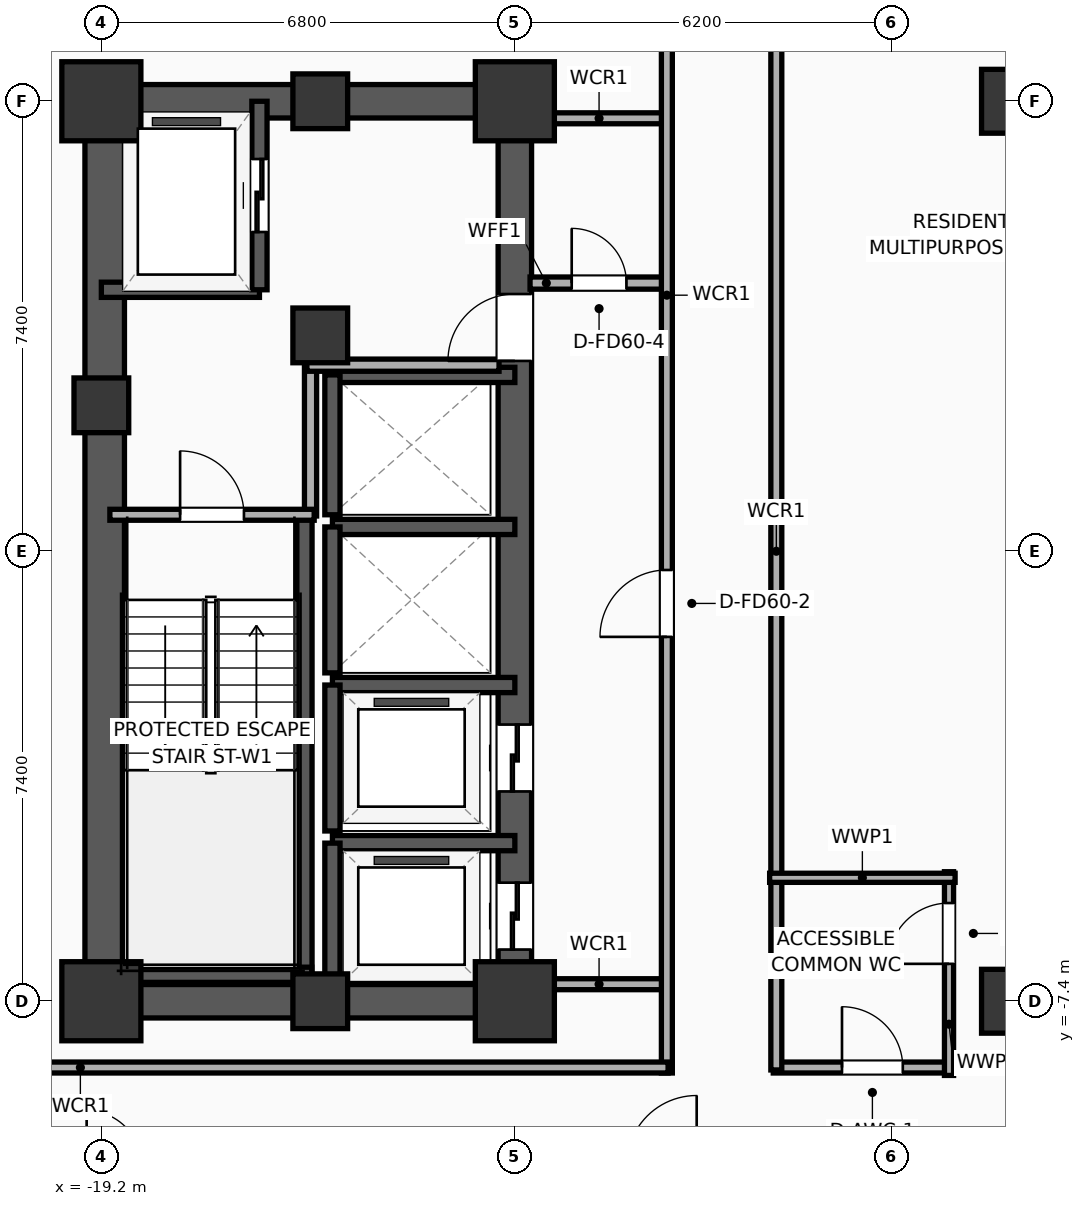
"""IFC4 building model, lengths in metres.
Left out: names, types, materials, properties, quantities, classifications, styles, units other than length and angle.
Written with IfcOpenShell. Run it as: python <this file> out.ifc"""

import sys

from ifc_helpers import new_model, si_unit, direction, frame, frame_2d, origin, origin_2d, place, context, subcontext, project, spatial, rectangle, extrude, element, fill, save


model = new_model("IFC4")
c1 = context("Model", 3, precision=1e-05, world=origin(), true_north=direction((0.0, 1.0)))
c2 = subcontext(c1, "Body", "Model", "MODEL_VIEW")
j1 = project(units=[si_unit("LENGTHUNIT", "METRE"), si_unit("PLANEANGLEUNIT", "RADIAN")], contexts=[c1])
p1 = place(None, origin())
s1 = spatial("IfcSite", under=j1, at=p1, CompositionType="ELEMENT")
p2 = place(p1, origin())
s2 = spatial("IfcBuilding", under=s1, at=p2, CompositionType="ELEMENT")
p3 = place(p2, frame((0.0, 0.0, 101.4)))
s3 = spatial("IfcBuildingStorey", under=s2, at=p3, CompositionType="ELEMENT", Elevation=101.4)
p4 = place(p3, frame((-19.2, -7.4, 0.0), z_axis=(0.0, 0.0, 1.0), x_axis=(1.0, 0.0, 0.0)))
e1 = element("IfcColumn", 1, at=p4, inside=s3, PredefinedType="COLUMN", context=c2, shape_type="SweptSolid", body=[
    extrude(rectangle(XDim=1.3, YDim=1.3, at=origin_2d()), origin(), (0.0, 0.0, 1.0), 3.9),
])
p5 = place(p3, frame((-19.2, 2.4, 0.0), z_axis=(0.0, 0.0, 1.0), x_axis=(1.0, 0.0, 0.0)))
e2 = element("IfcColumn", 2, at=p5, inside=s3, PredefinedType="COLUMN", context=c2, shape_type="SweptSolid", body=[
    extrude(rectangle(XDim=0.9, YDim=0.9, at=origin_2d()), origin(), (0.0, 0.0, 1.0), 3.9),
])
p6 = place(p3, frame((-19.2, 7.4, 0.0), z_axis=(0.0, 0.0, 1.0), x_axis=(1.0, 0.0, 0.0)))
e3 = element("IfcColumn", 3, at=p6, inside=s3, PredefinedType="COLUMN", context=c2, shape_type="SweptSolid", body=[
    extrude(rectangle(XDim=1.3, YDim=1.3, at=origin_2d()), origin(), (0.0, 0.0, 1.0), 3.9),
])
for number, where, z_axis, x_axis in (
    (4, (-15.6, -7.4, 0.0), (0.0, 0.0, 1.0), (1.0, 0.0, 0.0)),
    (5, (-15.6, 7.4, 0.0), (0.0, 0.0, 1.0), (1.0, 0.0, 0.0)),
):
    element("IfcColumn", number, at=place(p3, frame(where, z_axis=z_axis, x_axis=x_axis)), inside=s3, PredefinedType="COLUMN", context=c2, shape_type="SweptSolid", body=[
        extrude(rectangle(XDim=0.9, YDim=0.9, at=origin_2d()), origin(), (0.0, 0.0, 1.0), 3.9),
    ])
p7 = place(p3, frame((-12.4, -7.4, 0.0), z_axis=(0.0, 0.0, 1.0), x_axis=(1.0, 0.0, 0.0)))
e6 = element("IfcColumn", 6, at=p7, inside=s3, PredefinedType="COLUMN", context=c2, shape_type="SweptSolid", body=[
    extrude(rectangle(XDim=1.3, YDim=1.3, at=origin_2d()), origin(), (0.0, 0.0, 1.0), 3.9),
])
p8 = place(p3, frame((-15.6, 3.55, 0.0), z_axis=(0.0, 0.0, 1.0), x_axis=(1.0, 0.0, 0.0)))
e7 = element("IfcColumn", 7, at=p8, inside=s3, PredefinedType="COLUMN", context=c2, shape_type="SweptSolid", body=[
    extrude(rectangle(XDim=0.9, YDim=0.9, at=origin_2d()), origin(), (0.0, 0.0, 1.0), 3.9),
])
p9 = place(p3, frame((-12.4, 7.4, 0.0), z_axis=(0.0, 0.0, 1.0), x_axis=(1.0, 0.0, 0.0)))
e8 = element("IfcColumn", 8, at=p9, inside=s3, PredefinedType="COLUMN", context=c2, shape_type="SweptSolid", body=[
    extrude(rectangle(XDim=1.3, YDim=1.3, at=origin_2d()), origin(), (0.0, 0.0, 1.0), 3.9),
])
for number, where, z_axis, x_axis in (
    (9, (-19.475, -7.4, 0.0), (0.0, 0.0, 1.0), (1.0, 0.0, 0.0)),
    (10, (-19.475, 7.4, 0.0), (0.0, 0.0, 1.0), (1.0, 0.0, 0.0)),
):
    element("IfcWall", number, at=place(p3, frame(where, z_axis=z_axis, x_axis=x_axis)), inside=s3, PredefinedType="SHEAR", context=c2, shape_type="SweptSolid", body=[
        extrude(rectangle(XDim=7.35, YDim=0.55, at=frame_2d((3.675, 0.0))), origin(), (0.0, 0.0, 1.0), 3.65),
    ])
p10 = place(p3, frame((-19.145, -7.4, 0.0), z_axis=(0.0, 0.0, 1.0), x_axis=(0.0, 1.0, 0.0)))
e11 = element("IfcWall", 11, at=p10, inside=s3, PredefinedType="SHEAR", context=c2, shape_type="SweptSolid", body=[
    extrude(rectangle(XDim=14.8, YDim=0.65, at=frame_2d((7.4, 0.0))), origin(), (0.0, 0.0, 1.0), 3.65),
])
p11 = place(p3, frame((-12.4, -7.4, 0.0), z_axis=(0.0, 0.0, 1.0), x_axis=(0.0, 1.0, 0.0)))
e12 = element("IfcWall", 12, at=p11, inside=s3, PredefinedType="SHEAR", context=c2, shape_type="SweptSolid", body=[
    extrude(rectangle(XDim=14.8, YDim=0.55, at=frame_2d((7.4, 0.0))), origin(), (0.0, 0.0, 1.0), 3.65),
])
p12 = place(p11, frame((0.85, 0.0, 0.0)))
e13 = element("IfcOpeningElement", 13, at=p12, cuts=e12, PredefinedType="OPENING", context=c2, shape_type="SweptSolid", body=[
    extrude(rectangle(XDim=1.1, YDim=2.05, at=frame_2d((0.55, 1.025))), frame((0.0, 0.285, 0.0), z_axis=(0.0, -1.0, 0.0), x_axis=(1.0, 0.0, 0.0)), (0.0, 0.0, 1.0), 0.57),
])
p13 = place(p11, frame((3.45, 0.0, 0.0)))
e14 = element("IfcOpeningElement", 14, at=p13, cuts=e12, PredefinedType="OPENING", context=c2, shape_type="SweptSolid", body=[
    extrude(rectangle(XDim=1.1, YDim=2.05, at=frame_2d((0.55, 1.025))), frame((0.0, 0.285, 0.0), z_axis=(0.0, -1.0, 0.0), x_axis=(1.0, 0.0, 0.0)), (0.0, 0.0, 1.0), 0.57),
])
p14 = place(p11, frame((10.53, 0.0, 0.0)))
e15 = element("IfcOpeningElement", 15, at=p14, cuts=e12, PredefinedType="OPENING", context=c2, shape_type="SweptSolid", body=[
    extrude(rectangle(XDim=1.1, YDim=2.05, at=frame_2d((0.55, 1.025))), frame((0.0, 0.285, 0.0), z_axis=(0.0, -1.0, 0.0), x_axis=(1.0, 0.0, 0.0)), (0.0, 0.0, 1.0), 0.57),
])
p15 = place(p3, frame((-15.86, -7.085, 0.0), z_axis=(0.0, 0.0, 1.0), x_axis=(0.0, 1.0, 0.0)))
e16 = element("IfcWall", 16, at=p15, inside=s3, PredefinedType="SOLIDWALL", context=c2, shape_type="SweptSolid", body=[
    extrude(rectangle(XDim=7.685, YDim=0.25, at=frame_2d((3.843, 0.0))), origin(), (0.0, 0.0, 1.0), 3.65),
])
p16 = place(p3, frame((-19.2, -6.965, 0.0), z_axis=(0.0, 0.0, 1.0), x_axis=(1.0, 0.0, 0.0)))
e17 = element("IfcWall", 17, at=p16, inside=s3, PredefinedType="SOLIDWALL", context=c2, shape_type="SweptSolid", body=[
    extrude(rectangle(XDim=3.46, YDim=0.25, at=frame_2d((1.73, 0.0))), origin(), (0.0, 0.0, 1.0), 3.65),
])
for number, where, z_axis, x_axis in (
    (18, (-4.2, -7.4, 0.0), (0.0, 0.0, 1.0), (1.0, 0.0, 0.0)),
    (19, (-4.2, 7.4, 0.0), (0.0, 0.0, 1.0), (1.0, 0.0, 0.0)),
):
    element("IfcColumn", number, at=place(p3, frame(where, z_axis=z_axis, x_axis=x_axis)), inside=s3, PredefinedType="COLUMN", context=c2, shape_type="SweptSolid", body=[
        extrude(rectangle(XDim=1.05, YDim=1.05, at=origin_2d()), origin(), (0.0, 0.0, 1.0), 3.9),
    ])
p17 = place(p3, frame((-19.2, 4.3, 0.0), z_axis=(0.0, 0.0, 1.0), x_axis=(1.0, 0.0, 0.0)))
e20 = element("IfcWall", 20, at=p17, inside=s3, PredefinedType="SOLIDWALL", context=c2, shape_type="SweptSolid", body=[
    extrude(rectangle(XDim=2.6, YDim=0.25, at=frame_2d((1.3, 0.0))), origin(), (0.0, 0.0, 1.0), 3.65),
])
p18 = place(p3, frame((-16.6, 4.3, 0.0), z_axis=(0.0, 0.0, 1.0), x_axis=(0.0, 1.0, 0.0)))
e21 = element("IfcWall", 21, at=p18, inside=s3, PredefinedType="SOLIDWALL", context=c2, shape_type="SweptSolid", body=[
    extrude(rectangle(XDim=3.1, YDim=0.25, at=frame_2d((1.55, 0.0))), origin(), (0.0, 0.0, 1.0), 3.65),
])
p19 = place(p18, frame((0.95, 0.0, 0.0)))
e22 = element("IfcOpeningElement", 22, at=p19, cuts=e21, PredefinedType="OPENING", context=c2, shape_type="SweptSolid", body=[
    extrude(rectangle(XDim=1.2, YDim=2.05, at=frame_2d((0.6, 1.025))), frame((0.0, 0.135, 0.0), z_axis=(0.0, -1.0, 0.0), x_axis=(1.0, 0.0, 0.0)), (0.0, 0.0, 1.0), 0.27),
])
p20 = place(p3, frame((-12.4, -4.8, 0.0), z_axis=(0.0, 0.0, 1.0), x_axis=(-1.0, 0.0, 0.0)))
e23 = element("IfcWall", 23, at=p20, inside=s3, PredefinedType="SOLIDWALL", context=c2, shape_type="SweptSolid", body=[
    extrude(rectangle(XDim=3.0, YDim=0.25, at=frame_2d((1.5, 0.0))), origin(), (0.0, 0.0, 1.0), 3.65),
])
p21 = place(p3, frame((-15.4, -4.8, 0.0), z_axis=(0.0, 0.0, 1.0), x_axis=(0.0, -1.0, 0.0)))
e24 = element("IfcWall", 24, at=p21, inside=s3, PredefinedType="SOLIDWALL", context=c2, shape_type="SweptSolid", body=[
    extrude(rectangle(XDim=2.6, YDim=0.25, at=frame_2d((1.3, 0.0))), origin(), (0.0, 0.0, 1.0), 3.65),
])
p22 = place(p3, frame((-12.4, -2.2, 0.0), z_axis=(0.0, 0.0, 1.0), x_axis=(-1.0, 0.0, 0.0)))
e25 = element("IfcWall", 25, at=p22, inside=s3, PredefinedType="SOLIDWALL", context=c2, shape_type="SweptSolid", body=[
    extrude(rectangle(XDim=3.0, YDim=0.25, at=frame_2d((1.5, 0.0))), origin(), (0.0, 0.0, 1.0), 3.65),
])
p23 = place(p3, frame((-15.4, -2.2, 0.0), z_axis=(0.0, 0.0, 1.0), x_axis=(0.0, -1.0, 0.0)))
e26 = element("IfcWall", 26, at=p23, inside=s3, PredefinedType="SOLIDWALL", context=c2, shape_type="SweptSolid", body=[
    extrude(rectangle(XDim=2.4, YDim=0.25, at=frame_2d((1.2, 0.0))), origin(), (0.0, 0.0, 1.0), 3.65),
])
p24 = place(p3, frame((-12.4, 0.4, 0.0), z_axis=(0.0, 0.0, 1.0), x_axis=(-1.0, 0.0, 0.0)))
e27 = element("IfcWall", 27, at=p24, inside=s3, PredefinedType="SOLIDWALL", context=c2, shape_type="SweptSolid", body=[
    extrude(rectangle(XDim=3.0, YDim=0.25, at=frame_2d((1.5, 0.0))), origin(), (0.0, 0.0, 1.0), 3.65),
])
p25 = place(p3, frame((-15.4, 0.4, 0.0), z_axis=(0.0, 0.0, 1.0), x_axis=(0.0, -1.0, 0.0)))
e28 = element("IfcWall", 28, at=p25, inside=s3, PredefinedType="SOLIDWALL", context=c2, shape_type="SweptSolid", body=[
    extrude(rectangle(XDim=2.4, YDim=0.25, at=frame_2d((1.2, 0.0))), origin(), (0.0, 0.0, 1.0), 3.65),
])
p26 = place(p3, frame((-12.4, 2.9, 0.0), z_axis=(0.0, 0.0, 1.0), x_axis=(-1.0, 0.0, 0.0)))
e29 = element("IfcWall", 29, at=p26, inside=s3, PredefinedType="SOLIDWALL", context=c2, shape_type="SweptSolid", body=[
    extrude(rectangle(XDim=3.0, YDim=0.25, at=frame_2d((1.5, 0.0))), origin(), (0.0, 0.0, 1.0), 3.65),
])
p27 = place(p3, frame((-15.4, 2.9, 0.0), z_axis=(0.0, 0.0, 1.0), x_axis=(0.0, -1.0, 0.0)))
e30 = element("IfcWall", 30, at=p27, inside=s3, PredefinedType="SOLIDWALL", context=c2, shape_type="SweptSolid", body=[
    extrude(rectangle(XDim=2.3, YDim=0.25, at=frame_2d((1.15, 0.0))), origin(), (0.0, 0.0, 1.0), 3.65),
])
p28 = place(p3, frame((-15.76, 0.58, 0.0), z_axis=(0.0, 0.0, 1.0), x_axis=(0.0, 1.0, 0.0)))
e31 = element("IfcWall", 31, at=p28, inside=s3, PredefinedType="PARTITIONING", context=c2, shape_type="SweptSolid", body=[
    extrude(rectangle(XDim=2.52, YDim=0.2, at=frame_2d((1.26, 0.0))), origin(), (0.0, 0.0, 1.0), 3.65),
])
p29 = place(p3, frame((-15.82, 3.06, 0.0), z_axis=(0.0, 0.0, 1.0), x_axis=(1.0, 0.0, 0.0)))
e32 = element("IfcWall", 32, at=p29, inside=s3, PredefinedType="PARTITIONING", context=c2, shape_type="SweptSolid", body=[
    extrude(rectangle(XDim=3.16, YDim=0.2, at=frame_2d((1.58, 0.0))), origin(), (0.0, 0.0, 1.0), 3.65),
])
p30 = place(p3, frame((-19.06, 0.6, 0.0), z_axis=(0.0, 0.0, 1.0), x_axis=(1.0, 0.0, 0.0)))
e33 = element("IfcWall", 33, at=p30, inside=s3, PredefinedType="PARTITIONING", context=c2, shape_type="SweptSolid", body=[
    extrude(rectangle(XDim=3.36, YDim=0.18, at=frame_2d((1.68, 0.0))), origin(), (0.0, 0.0, 1.0), 3.65),
])
p31 = place(p30, frame((1.155, 0.0, 0.0)))
e34 = element("IfcOpeningElement", 34, at=p31, cuts=e33, PredefinedType="OPENING", context=c2, shape_type="SweptSolid", body=[
    extrude(rectangle(XDim=1.05, YDim=2.05, at=frame_2d((0.525, 1.025))), frame((0.0, 0.1, 0.0), z_axis=(0.0, -1.0, 0.0), x_axis=(1.0, 0.0, 0.0)), (0.0, 0.0, 1.0), 0.2),
])
p32 = place(p3, frame((-12.15, 4.41, 0.0), z_axis=(0.0, 0.0, 1.0), x_axis=(1.0, 0.0, 0.0)))
e35 = element("IfcWall", 35, at=p32, inside=s3, PredefinedType="PARTITIONING", context=c2, shape_type="SweptSolid", body=[
    extrude(rectangle(XDim=2.27, YDim=0.2, at=frame_2d((1.135, 0.0))), origin(), (0.0, 0.0, 1.0), 3.65),
])
p33 = place(p32, frame((0.685, 0.0, 0.0)))
e36 = element("IfcOpeningElement", 36, at=p33, cuts=e35, PredefinedType="OPENING", context=c2, shape_type="SweptSolid", body=[
    extrude(rectangle(XDim=0.9, YDim=2.05, at=frame_2d((0.45, 1.025))), frame((0.0, 0.11, 0.0), z_axis=(0.0, -1.0, 0.0), x_axis=(1.0, 0.0, 0.0)), (0.0, 0.0, 1.0), 0.22),
])
for number, where, z_axis, x_axis in (
    (37, (-12.15, 7.12, 0.0), (0.0, 0.0, 1.0), (1.0, 0.0, 0.0)),
    (38, (-12.15, -7.12, 0.0), (0.0, 0.0, 1.0), (1.0, 0.0, 0.0)),
):
    element("IfcWall", number, at=place(p3, frame(where, z_axis=z_axis, x_axis=x_axis)), inside=s3, PredefinedType="PARTITIONING", context=c2, shape_type="SweptSolid", body=[
        extrude(rectangle(XDim=2.27, YDim=0.18, at=frame_2d((1.135, 0.0))), origin(), (0.0, 0.0, 1.0), 3.65),
    ])
p34 = place(p3, frame((-9.9, -8.58, 0.0), z_axis=(0.0, 0.0, 1.0), x_axis=(0.0, 1.0, 0.0)))
e39 = element("IfcWall", 39, at=p34, inside=s3, PredefinedType="PARTITIONING", context=c2, shape_type="SweptSolid", body=[
    extrude(rectangle(XDim=17.16, YDim=0.18, at=frame_2d((8.58, 0.0))), origin(), (0.0, 0.0, 1.0), 3.65),
])
p35 = place(p34, frame((7.172, 0.0, 0.0)))
e40 = element("IfcOpeningElement", 40, at=p35, cuts=e39, PredefinedType="OPENING", context=c2, shape_type="SweptSolid", body=[
    extrude(rectangle(XDim=1.1, YDim=2.05, at=frame_2d((0.55, 1.025))), frame((0.0, 0.1, 0.0), z_axis=(0.0, -1.0, 0.0), x_axis=(1.0, 0.0, 0.0)), (0.0, 0.0, 1.0), 0.2),
])
p36 = place(p3, frame((-29.21, -8.49, 0.0), z_axis=(0.0, 0.0, 1.0), x_axis=(1.0, 0.0, 0.0)))
e41 = element("IfcWall", 41, at=p36, inside=s3, PredefinedType="PARTITIONING", context=c2, shape_type="SweptSolid", body=[
    extrude(rectangle(XDim=19.33, YDim=0.18, at=frame_2d((9.665, 0.0))), origin(), (0.0, 0.0, 1.0), 3.65),
])
p37 = place(p3, frame((-8.15, -8.49, 0.0), z_axis=(0.0, 0.0, 1.0), x_axis=(1.0, 0.0, 0.0)))
e42 = element("IfcWall", 42, at=p37, inside=s3, PredefinedType="PARTITIONING", context=c2, shape_type="SweptSolid", body=[
    extrude(rectangle(XDim=16.3, YDim=0.18, at=frame_2d((8.15, 0.0))), origin(), (0.0, 0.0, 1.0), 3.65),
])
p38 = place(p37, frame((1.13, 0.0, 0.0)))
e43 = element("IfcOpeningElement", 43, at=p38, cuts=e42, PredefinedType="OPENING", context=c2, shape_type="SweptSolid", body=[
    extrude(rectangle(XDim=1.0, YDim=2.05, at=frame_2d((0.5, 1.025))), frame((0.0, 0.1, 0.0), z_axis=(0.0, -1.0, 0.0), x_axis=(1.0, 0.0, 0.0)), (0.0, 0.0, 1.0), 0.2),
])
p39 = place(p37, frame((10.12, 0.0, 0.0)))
e44 = element("IfcOpeningElement", 44, at=p39, cuts=e42, PredefinedType="OPENING", context=c2, shape_type="SweptSolid", body=[
    extrude(rectangle(XDim=0.95, YDim=2.05, at=frame_2d((0.475, 1.025))), frame((0.0, 0.1, 0.0), z_axis=(0.0, -1.0, 0.0), x_axis=(1.0, 0.0, 0.0)), (0.0, 0.0, 1.0), 0.2),
])
p40 = place(p3, frame((-8.1, -8.53, 0.0), z_axis=(0.0, 0.0, 1.0), x_axis=(0.0, 1.0, 0.0)))
e45 = element("IfcWall", 45, at=p40, inside=s3, PredefinedType="PARTITIONING", context=c2, shape_type="SweptSolid", body=[
    extrude(rectangle(XDim=17.06, YDim=0.18, at=frame_2d((8.53, 0.0))), origin(), (0.0, 0.0, 1.0), 3.65),
])
p41 = place(p3, frame((-5.26, -8.62, 0.0), z_axis=(0.0, 0.0, 1.0), x_axis=(0.0, 1.0, 0.0)))
e46 = element("IfcWall", 46, at=p41, inside=s3, PredefinedType="PLUMBINGWALL", context=c2, shape_type="SweptSolid", body=[
    extrude(rectangle(XDim=3.35, YDim=0.15, at=frame_2d((1.675, 0.0))), origin(), (0.0, 0.0, 1.0), 3.65),
])
p42 = place(p41, frame((1.835, 0.0, 0.0)))
e47 = element("IfcOpeningElement", 47, at=p42, cuts=e46, PredefinedType="OPENING", context=c2, shape_type="SweptSolid", body=[
    extrude(rectangle(XDim=1.0, YDim=2.05, at=frame_2d((0.5, 1.025))), frame((0.0, 0.085, 0.0), z_axis=(0.0, -1.0, 0.0), x_axis=(1.0, 0.0, 0.0)), (0.0, 0.0, 1.0), 0.17),
])
p43 = place(p3, frame((-8.21, -5.37, 0.0), z_axis=(0.0, 0.0, 1.0), x_axis=(1.0, 0.0, 0.0)))
e48 = element("IfcWall", 48, at=p43, inside=s3, PredefinedType="PLUMBINGWALL", context=c2, shape_type="SweptSolid", body=[
    extrude(rectangle(XDim=3.05, YDim=0.15, at=frame_2d((1.525, 0.0))), origin(), (0.0, 0.0, 1.0), 3.65),
])
p44 = place(p19, origin())
e49 = element("IfcDoor", 49, at=p44, inside=s3, OperationType="SLIDING_TO_LEFT", PredefinedType="DOOR", context=c2, shape_type="SweptSolid", body=[
    extrude(rectangle(XDim=1.2, YDim=2.05, at=frame_2d((0.6, 1.025))), frame((0.0, 0.025, 0.0), z_axis=(0.0, -1.0, 0.0), x_axis=(1.0, 0.0, 0.0)), (0.0, 0.0, 1.0), 0.05),
])
fill(e22, e49)
p45 = place(p12, origin())
e50 = element("IfcDoor", 50, at=p45, inside=s3, OperationType="SLIDING_TO_LEFT", PredefinedType="DOOR", context=c2, shape_type="SweptSolid", body=[
    extrude(rectangle(XDim=1.1, YDim=2.05, at=frame_2d((0.55, 1.025))), frame((0.0, 0.025, 0.0), z_axis=(0.0, -1.0, 0.0), x_axis=(1.0, 0.0, 0.0)), (0.0, 0.0, 1.0), 0.05),
])
fill(e13, e50)
p46 = place(p13, origin())
e51 = element("IfcDoor", 51, at=p46, inside=s3, OperationType="SLIDING_TO_LEFT", PredefinedType="DOOR", context=c2, shape_type="SweptSolid", body=[
    extrude(rectangle(XDim=1.1, YDim=2.05, at=frame_2d((0.55, 1.025))), frame((0.0, 0.025, 0.0), z_axis=(0.0, -1.0, 0.0), x_axis=(1.0, 0.0, 0.0)), (0.0, 0.0, 1.0), 0.05),
])
fill(e14, e51)
p47 = place(p31, origin())
e52 = element("IfcDoor", 52, at=p47, inside=s3, OperationType="SINGLE_SWING_LEFT", PredefinedType="DOOR", context=c2, shape_type="SweptSolid", body=[
    extrude(rectangle(XDim=1.05, YDim=2.05, at=frame_2d((0.525, 1.025))), frame((0.0, 0.025, 0.0), z_axis=(0.0, -1.0, 0.0), x_axis=(1.0, 0.0, 0.0)), (0.0, 0.0, 1.0), 0.05),
])
fill(e34, e52)
p48 = place(p33, origin())
e53 = element("IfcDoor", 53, at=p48, inside=s3, OperationType="SINGLE_SWING_LEFT", PredefinedType="DOOR", context=c2, shape_type="SweptSolid", body=[
    extrude(rectangle(XDim=0.9, YDim=2.05, at=frame_2d((0.45, 1.025))), frame((0.0, 0.025, 0.0), z_axis=(0.0, -1.0, 0.0), x_axis=(1.0, 0.0, 0.0)), (0.0, 0.0, 1.0), 0.05),
])
fill(e36, e53)
p49 = place(p35, origin())
e54 = element("IfcDoor", 54, at=p49, inside=s3, OperationType="SINGLE_SWING_LEFT", PredefinedType="DOOR", context=c2, shape_type="SweptSolid", body=[
    extrude(rectangle(XDim=1.1, YDim=2.05, at=frame_2d((0.55, 1.025))), frame((0.0, 0.025, 0.0), z_axis=(0.0, -1.0, 0.0), x_axis=(1.0, 0.0, 0.0)), (0.0, 0.0, 1.0), 0.05),
])
fill(e40, e54)
p50 = place(p38, origin())
e55 = element("IfcDoor", 55, at=p50, inside=s3, OperationType="SINGLE_SWING_LEFT", PredefinedType="DOOR", context=c2, shape_type="SweptSolid", body=[
    extrude(rectangle(XDim=1.0, YDim=2.05, at=frame_2d((0.5, 1.025))), frame((0.0, 0.025, 0.0), z_axis=(0.0, -1.0, 0.0), x_axis=(1.0, 0.0, 0.0)), (0.0, 0.0, 1.0), 0.05),
])
fill(e43, e55)
p51 = place(p42, origin())
e56 = element("IfcDoor", 56, at=p51, inside=s3, OperationType="SINGLE_SWING_LEFT", PredefinedType="DOOR", context=c2, shape_type="SweptSolid", body=[
    extrude(rectangle(XDim=1.0, YDim=2.05, at=frame_2d((0.5, 1.025))), frame((0.0, 0.025, 0.0), z_axis=(0.0, -1.0, 0.0), x_axis=(1.0, 0.0, 0.0)), (0.0, 0.0, 1.0), 0.05),
])
fill(e47, e56)
p52 = place(p14, origin())
e57 = element("IfcDoor", 57, at=p52, inside=s3, OperationType="SINGLE_SWING_LEFT", PredefinedType="DOOR", context=c2, shape_type="SweptSolid", body=[
    extrude(rectangle(XDim=1.1, YDim=2.05, at=frame_2d((0.55, 1.025))), frame((0.0, 0.025, 0.0), z_axis=(0.0, -1.0, 0.0), x_axis=(1.0, 0.0, 0.0)), (0.0, 0.0, 1.0), 0.05),
])
fill(e15, e57)
save(model, sys.argv[1])
